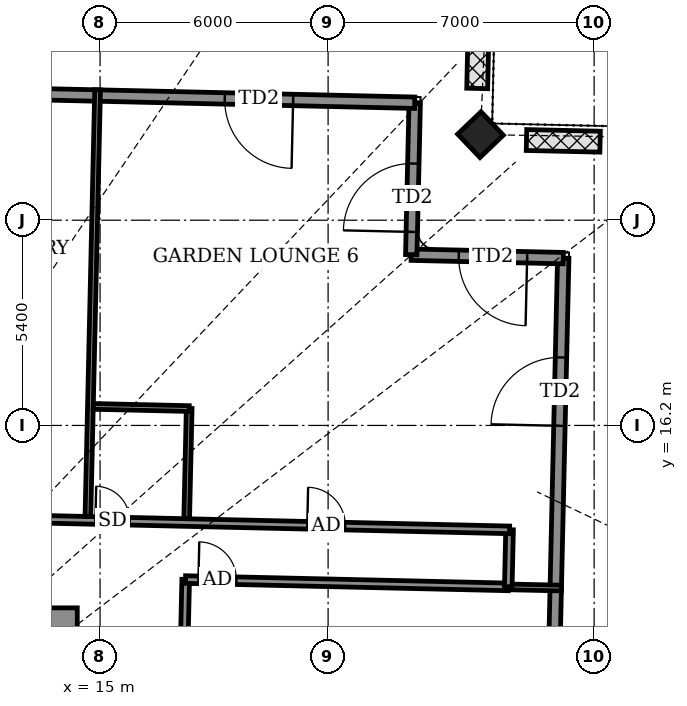
"""IFC4 building model, lengths in metres.
Left out: names, types, materials, properties, quantities, classifications, styles, units other than length and angle.
Written with IfcOpenShell. Run it as: python <this file> out.ifc"""

import sys

from ifc_helpers import new_model, si_unit, direction, frame, frame_2d, origin, origin_2d, place, context, subcontext, project, spatial, rectangle, extrude, element, fill, save


model = new_model("IFC4")
c1 = context("Model", 3, precision=1e-05, world=origin(), true_north=direction((0.0, 1.0)))
c2 = subcontext(c1, "Body", "Model", "MODEL_VIEW")
j1 = project(units=[si_unit("LENGTHUNIT", "METRE"), si_unit("PLANEANGLEUNIT", "RADIAN")], contexts=[c1])
p1 = place(None, origin())
s1 = spatial("IfcSite", under=j1, at=p1, CompositionType="ELEMENT")
p2 = place(p1, origin())
s2 = spatial("IfcBuilding", under=s1, at=p2, CompositionType="ELEMENT")
p3 = place(p2, frame((0.0, 0.0, 329.7)))
s3 = spatial("IfcBuildingStorey", under=s2, at=p3, CompositionType="ELEMENT", Elevation=329.7)
p4 = place(p3, frame((25.01, 23.851, -0.55), z_axis=(0.0, 0.0, 1.0), x_axis=(-0.690854032309, 0.722994264183, 0.0)))
e1 = element("IfcColumn", 1, at=p4, inside=s3, PredefinedType="COLUMN", context=c2, shape_type="SweptSolid", body=[
    extrude(rectangle(XDim=0.85, YDim=0.85, at=origin_2d()), origin(), (0.0, 0.0, 1.0), 4.6),
])
p5 = place(p3, frame((26.897, 7.826, 0.0), z_axis=(0.0, 0.0, 1.0), x_axis=(0.022695801562, 0.999742417121, 0.0)))
e2 = element("IfcWall", 2, at=p5, inside=s3, PredefinedType="SOLIDWALL", context=c2, shape_type="SweptSolid", body=[
    extrude(rectangle(XDim=12.779, YDim=0.3, at=frame_2d((6.39, 0.0))), origin(), (0.0, 0.0, 1.0), 2.25),
])
p6 = place(p5, frame((1.179, 0.0, 0.0)))
e3 = element("IfcOpeningElement", 3, at=p6, cuts=e2, PredefinedType="OPENING", context=c2, shape_type="SweptSolid", body=[
    extrude(rectangle(XDim=1.8, YDim=2.0, at=frame_2d((0.9, 1.0))), frame((0.0, 0.16, 0.0), z_axis=(0.0, -1.0, 0.0), x_axis=(1.0, 0.0, 0.0)), (0.0, 0.0, 1.0), 0.32),
])
p7 = place(p5, frame((8.366, 0.0, 0.0)))
e4 = element("IfcOpeningElement", 4, at=p7, cuts=e2, PredefinedType="OPENING", context=c2, shape_type="SweptSolid", body=[
    extrude(rectangle(XDim=1.8, YDim=2.0, at=frame_2d((0.9, 1.0))), frame((0.0, 0.16, 0.0), z_axis=(0.0, -1.0, 0.0), x_axis=(1.0, 0.0, 0.0)), (0.0, 0.0, 1.0), 0.32),
])
p8 = place(p3, frame((27.187, 20.602, 0.0), z_axis=(0.0, 0.0, 1.0), x_axis=(-0.999740826251, 0.022765770952, 0.0)))
e5 = element("IfcWall", 5, at=p8, inside=s3, PredefinedType="SOLIDWALL", context=c2, shape_type="SweptSolid", body=[
    extrude(rectangle(XDim=4.0, YDim=0.3, at=frame_2d((2.0, 0.0))), origin(), (0.0, 0.0, 1.0), 2.25),
])
p9 = place(p8, frame((0.95, 0.0, 0.0)))
e6 = element("IfcOpeningElement", 6, at=p9, cuts=e5, PredefinedType="OPENING", context=c2, shape_type="SweptSolid", body=[
    extrude(rectangle(XDim=1.8, YDim=2.0, at=frame_2d((0.9, 1.0))), frame((0.0, 0.16, 0.0), z_axis=(0.0, -1.0, 0.0), x_axis=(1.0, 0.0, 0.0)), (0.0, 0.0, 1.0), 0.32),
])
p10 = place(p3, frame((23.188, 20.693, 0.0), z_axis=(0.0, 0.0, 1.0), x_axis=(0.022772718728, 0.999740668014, 0.0)))
e7 = element("IfcWall", 7, at=p10, inside=s3, PredefinedType="SOLIDWALL", context=c2, shape_type="SweptSolid", body=[
    extrude(rectangle(XDim=3.999, YDim=0.3, at=frame_2d((2.0, 0.0))), origin(), (0.0, 0.0, 1.0), 2.1),
])
p11 = place(p10, frame((0.599, 0.0, 0.0)))
e8 = element("IfcOpeningElement", 8, at=p11, cuts=e7, PredefinedType="OPENING", context=c2, shape_type="SweptSolid", body=[
    extrude(rectangle(XDim=1.8, YDim=2.0, at=frame_2d((0.9, 1.0))), frame((0.0, 0.16, 0.0), z_axis=(0.0, -1.0, 0.0), x_axis=(1.0, 0.0, 0.0)), (0.0, 0.0, 1.0), 0.32),
])
p12 = place(p3, frame((23.279, 24.691, 0.0), z_axis=(0.0, 0.0, 1.0), x_axis=(-0.9997425899, 0.022688189451, 0.0)))
e9 = element("IfcWall", 9, at=p12, inside=s3, PredefinedType="SOLIDWALL", context=c2, shape_type="SweptSolid", body=[
    extrude(rectangle(XDim=47.25, YDim=0.3, at=frame_2d((23.625, 0.0))), origin(), (0.0, 0.0, 1.0), 2.1),
])
p13 = place(p12, frame((3.2, 0.0, 0.0)))
e10 = element("IfcOpeningElement", 10, at=p13, cuts=e9, PredefinedType="OPENING", context=c2, shape_type="SweptSolid", body=[
    extrude(rectangle(XDim=1.8, YDim=2.0, at=frame_2d((0.9, 1.0))), frame((0.0, 0.16, 0.0), z_axis=(0.0, -1.0, 0.0), x_axis=(1.0, 0.0, 0.0)), (0.0, 0.0, 1.0), 0.32),
])
p14 = place(p12, frame((10.45, 0.0, 0.0)))
e11 = element("IfcOpeningElement", 11, at=p14, cuts=e9, PredefinedType="OPENING", context=c2, shape_type="SweptSolid", body=[
    extrude(rectangle(XDim=1.8, YDim=2.0, at=frame_2d((0.9, 1.0))), frame((0.0, 0.16, 0.0), z_axis=(0.0, -1.0, 0.0), x_axis=(1.0, 0.0, 0.0)), (0.0, 0.0, 1.0), 0.32),
])
p15 = place(p12, frame((17.7, 0.0, 0.0)))
e12 = element("IfcOpeningElement", 12, at=p15, cuts=e9, PredefinedType="OPENING", context=c2, shape_type="SweptSolid", body=[
    extrude(rectangle(XDim=1.8, YDim=2.0, at=frame_2d((0.9, 1.0))), frame((0.0, 0.16, 0.0), z_axis=(0.0, -1.0, 0.0), x_axis=(1.0, 0.0, 0.0)), (0.0, 0.0, 1.0), 0.32),
])
p16 = place(p12, frame((28.3, 0.0, 0.0)))
e13 = element("IfcOpeningElement", 13, at=p16, cuts=e9, PredefinedType="OPENING", context=c2, shape_type="SweptSolid", body=[
    extrude(rectangle(XDim=1.8, YDim=2.0, at=frame_2d((0.9, 1.0))), frame((0.0, 0.16, 0.0), z_axis=(0.0, -1.0, 0.0), x_axis=(1.0, 0.0, 0.0)), (0.0, 0.0, 1.0), 0.32),
])
p17 = place(p12, frame((35.125, 0.0, 0.0)))
e14 = element("IfcOpeningElement", 14, at=p17, cuts=e9, PredefinedType="OPENING", context=c2, shape_type="SweptSolid", body=[
    extrude(rectangle(XDim=1.8, YDim=2.0, at=frame_2d((0.9, 1.0))), frame((0.0, 0.16, 0.0), z_axis=(0.0, -1.0, 0.0), x_axis=(1.0, 0.0, 0.0)), (0.0, 0.0, 1.0), 0.32),
])
p18 = place(p12, frame((42.7, 0.0, 0.0)))
e15 = element("IfcOpeningElement", 15, at=p18, cuts=e9, PredefinedType="OPENING", context=c2, shape_type="SweptSolid", body=[
    extrude(rectangle(XDim=1.8, YDim=2.0, at=frame_2d((0.9, 1.0))), frame((0.0, 0.16, 0.0), z_axis=(0.0, -1.0, 0.0), x_axis=(1.0, 0.0, 0.0)), (0.0, 0.0, 1.0), 0.32),
])
p19 = place(p3, frame((24.968, 27.054, 0.0), z_axis=(0.0, 0.0, 1.0), x_axis=(-0.022601425009, -0.999744555168, 0.0)))
e16 = element("IfcWall", 16, at=p19, inside=s3, PredefinedType="USERDEFINED", context=c2, shape_type="SweptSolid", body=[
    extrude(rectangle(XDim=1.988, YDim=0.55, at=frame_2d((0.994, 0.0))), origin(), (0.0, 0.0, 1.0), 0.8),
])
p20 = place(p3, frame((26.22, 23.71, 0.0), z_axis=(0.0, 0.0, 1.0), x_axis=(0.999742745482, -0.022681332769, 0.0)))
e17 = element("IfcWall", 17, at=p20, inside=s3, PredefinedType="USERDEFINED", context=c2, shape_type="SweptSolid", body=[
    extrude(rectangle(XDim=1.938, YDim=0.55, at=frame_2d((0.969, 0.0))), origin(), (0.0, 0.0, 1.0), 0.8),
])
p21 = place(p3, frame((17.155, 7.846, 0.0), z_axis=(0.0, 0.0, 1.0), x_axis=(0.022745886685, 0.999741278851, 0.0)))
e18 = element("IfcWall", 18, at=p21, inside=s3, PredefinedType="PARTITIONING", context=c2, shape_type="SweptSolid", body=[
    extrude(rectangle(XDim=4.304, YDim=0.2, at=frame_2d((2.152, 0.0))), origin(), (0.0, 0.0, 1.0), 4.05),
])
p22 = place(p3, frame((17.248, 12.145, 0.0), z_axis=(0.0, 0.0, 1.0), x_axis=(0.999741583257, -0.022732503302, 0.0)))
e19 = element("IfcWall", 19, at=p22, inside=s3, PredefinedType="PARTITIONING", context=c2, shape_type="SweptSolid", body=[
    extrude(rectangle(XDim=8.495, YDim=0.2, at=frame_2d((4.248, 0.0))), origin(), (0.0, 0.0, 1.0), 4.05),
])
p23 = place(p22, frame((0.34, 0.0, 0.0)))
e20 = element("IfcOpeningElement", 20, at=p23, cuts=e19, PredefinedType="OPENING", context=c2, shape_type="SweptSolid", body=[
    extrude(rectangle(XDim=1.0, YDim=2.1, at=frame_2d((0.5, 1.05))), frame((0.0, 0.11, 0.0), z_axis=(0.0, -1.0, 0.0), x_axis=(1.0, 0.0, 0.0)), (0.0, 0.0, 1.0), 0.22),
])
p24 = place(p3, frame((25.741, 11.952, 0.0), z_axis=(0.0, 0.0, 1.0), x_axis=(0.999754467928, -0.022158606881, 0.0)))
e21 = element("IfcWall", 21, at=p24, inside=s3, PredefinedType="PARTITIONING", context=c2, shape_type="SweptSolid", body=[
    extrude(rectangle(XDim=1.399, YDim=0.15, at=frame_2d((0.7, 0.0))), origin(), (0.0, 0.0, 1.0), 4.05),
])
p25 = place(p3, frame((25.741, 11.956, 0.0), z_axis=(0.0, 0.0, 1.0), x_axis=(0.022617910375, 0.999744182344, 0.0)))
e22 = element("IfcWall", 22, at=p25, inside=s3, PredefinedType="PARTITIONING", context=c2, shape_type="SweptSolid", body=[
    extrude(rectangle(XDim=1.5, YDim=0.2, at=frame_2d((0.75, 0.0))), origin(), (0.0, 0.0, 1.0), 4.05),
])
p26 = place(p3, frame((-26.962, 14.649, 0.0), z_axis=(0.0, 0.0, 1.0), x_axis=(0.999742499365, -0.022692178484, 0.0)))
e23 = element("IfcWall", 23, at=p26, inside=s3, PredefinedType="PARTITIONING", context=c2, shape_type="SweptSolid", body=[
    extrude(rectangle(XDim=52.75, YDim=0.2, at=frame_2d((26.375, 0.0))), origin(), (0.0, 0.0, 1.0), 2.1),
])
p27 = place(p26, frame((47.426, 0.0, 0.0)))
e24 = element("IfcOpeningElement", 24, at=p27, cuts=e23, PredefinedType="OPENING", context=c2, shape_type="SweptSolid", body=[
    extrude(rectangle(XDim=1.0, YDim=2.1, at=frame_2d((0.5, 1.05))), frame((0.0, 0.11, 0.0), z_axis=(0.0, -1.0, 0.0), x_axis=(1.0, 0.0, 0.0)), (0.0, 0.0, 1.0), 0.22),
])
p28 = place(p26, frame((41.85, 0.0, 0.0)))
e25 = element("IfcOpeningElement", 25, at=p28, cuts=e23, PredefinedType="OPENING", context=c2, shape_type="SweptSolid", body=[
    extrude(rectangle(XDim=0.9, YDim=2.1, at=frame_2d((0.45, 1.05))), frame((0.0, 0.11, 0.0), z_axis=(0.0, -1.0, 0.0), x_axis=(1.0, 0.0, 0.0)), (0.0, 0.0, 1.0), 0.22),
])
p29 = place(p26, frame((36.824, 0.0, 0.0)))
e26 = element("IfcOpeningElement", 26, at=p29, cuts=e23, PredefinedType="OPENING", context=c2, shape_type="SweptSolid", body=[
    extrude(rectangle(XDim=1.0, YDim=2.1, at=frame_2d((0.5, 1.05))), frame((0.0, 0.11, 0.0), z_axis=(0.0, -1.0, 0.0), x_axis=(1.0, 0.0, 0.0)), (0.0, 0.0, 1.0), 0.22),
])
p30 = place(p26, frame((28.436, 0.0, 0.0)))
e27 = element("IfcOpeningElement", 27, at=p30, cuts=e23, PredefinedType="OPENING", context=c2, shape_type="SweptSolid", body=[
    extrude(rectangle(XDim=1.0, YDim=2.1, at=frame_2d((0.5, 1.05))), frame((0.0, 0.11, 0.0), z_axis=(0.0, -1.0, 0.0), x_axis=(1.0, 0.0, 0.0)), (0.0, 0.0, 1.0), 0.22),
])
p31 = place(p26, frame((33.45, 0.0, 0.0)))
e28 = element("IfcOpeningElement", 28, at=p31, cuts=e23, PredefinedType="OPENING", context=c2, shape_type="SweptSolid", body=[
    extrude(rectangle(XDim=0.9, YDim=2.1, at=frame_2d((0.45, 1.05))), frame((0.0, 0.11, 0.0), z_axis=(0.0, -1.0, 0.0), x_axis=(1.0, 0.0, 0.0)), (0.0, 0.0, 1.0), 0.22),
])
p32 = place(p26, frame((24.05, 0.0, 0.0)))
e29 = element("IfcOpeningElement", 29, at=p32, cuts=e23, PredefinedType="OPENING", context=c2, shape_type="SweptSolid", body=[
    extrude(rectangle(XDim=1.0, YDim=2.1, at=frame_2d((0.5, 1.05))), frame((0.0, 0.11, 0.0), z_axis=(0.0, -1.0, 0.0), x_axis=(1.0, 0.0, 0.0)), (0.0, 0.0, 1.0), 0.22),
])
p33 = place(p26, frame((17.95, 0.0, 0.0)))
e30 = element("IfcOpeningElement", 30, at=p33, cuts=e23, PredefinedType="OPENING", context=c2, shape_type="SweptSolid", body=[
    extrude(rectangle(XDim=1.0, YDim=2.1, at=frame_2d((0.5, 1.05))), frame((0.0, 0.11, 0.0), z_axis=(0.0, -1.0, 0.0), x_axis=(1.0, 0.0, 0.0)), (0.0, 0.0, 1.0), 0.22),
])
p34 = place(p26, frame((21.65, 0.0, 0.0)))
e31 = element("IfcOpeningElement", 31, at=p34, cuts=e23, PredefinedType="OPENING", context=c2, shape_type="SweptSolid", body=[
    extrude(rectangle(XDim=0.9, YDim=2.1, at=frame_2d((0.45, 1.05))), frame((0.0, 0.11, 0.0), z_axis=(0.0, -1.0, 0.0), x_axis=(1.0, 0.0, 0.0)), (0.0, 0.0, 1.0), 0.22),
])
p35 = place(p26, frame((13.314, 0.0, 0.0)))
e32 = element("IfcOpeningElement", 32, at=p35, cuts=e23, PredefinedType="OPENING", context=c2, shape_type="SweptSolid", body=[
    extrude(rectangle(XDim=1.0, YDim=2.1, at=frame_2d((0.5, 1.05))), frame((0.0, 0.11, 0.0), z_axis=(0.0, -1.0, 0.0), x_axis=(1.0, 0.0, 0.0)), (0.0, 0.0, 1.0), 0.22),
])
p36 = place(p26, frame((10.4, 0.0, 0.0)))
e33 = element("IfcOpeningElement", 33, at=p36, cuts=e23, PredefinedType="OPENING", context=c2, shape_type="SweptSolid", body=[
    extrude(rectangle(XDim=0.9, YDim=2.1, at=frame_2d((0.45, 1.05))), frame((0.0, 0.11, 0.0), z_axis=(0.0, -1.0, 0.0), x_axis=(1.0, 0.0, 0.0)), (0.0, 0.0, 1.0), 0.22),
])
p37 = place(p26, frame((1.288, 0.0, 0.0)))
e34 = element("IfcOpeningElement", 34, at=p37, cuts=e23, PredefinedType="OPENING", context=c2, shape_type="SweptSolid", body=[
    extrude(rectangle(XDim=1.0, YDim=2.1, at=frame_2d((0.5, 1.05))), frame((0.0, 0.11, 0.0), z_axis=(0.0, -1.0, 0.0), x_axis=(1.0, 0.0, 0.0)), (0.0, 0.0, 1.0), 0.22),
])
p38 = place(p26, frame((8.0, 0.0, 0.0)))
e35 = element("IfcOpeningElement", 35, at=p38, cuts=e23, PredefinedType="OPENING", context=c2, shape_type="SweptSolid", body=[
    extrude(rectangle(XDim=0.9, YDim=2.1, at=frame_2d((0.45, 1.05))), frame((0.0, 0.11, 0.0), z_axis=(0.0, -1.0, 0.0), x_axis=(1.0, 0.0, 0.0)), (0.0, 0.0, 1.0), 0.22),
])
p39 = place(p3, frame((14.68, 13.808, 0.0), z_axis=(0.0, 0.0, 1.0), x_axis=(0.022726839589, 0.999741712025, 0.0)))
e36 = element("IfcWall", 36, at=p39, inside=s3, PredefinedType="PARTITIONING", context=c2, shape_type="SweptSolid", body=[
    extrude(rectangle(XDim=11.226, YDim=0.15, at=frame_2d((5.613, 0.0))), origin(), (0.0, 0.0, 1.0), 2.1),
])
p40 = place(p3, frame((17.279, 13.749, 0.0), z_axis=(0.0, 0.0, 1.0), x_axis=(0.022732880677, 0.999741574676, 0.0)))
e37 = element("IfcWall", 37, at=p40, inside=s3, PredefinedType="PARTITIONING", context=c2, shape_type="SweptSolid", body=[
    extrude(rectangle(XDim=2.9, YDim=0.15, at=frame_2d((1.45, 0.0))), origin(), (0.0, 0.0, 1.0), 2.25),
])
p41 = place(p3, frame((14.821, 16.701, 0.0), z_axis=(0.0, 0.0, 1.0), x_axis=(0.9997461113, -0.022532486354, 0.0)))
e38 = element("IfcWall", 38, at=p41, inside=s3, PredefinedType="PARTITIONING", context=c2, shape_type="SweptSolid", body=[
    extrude(rectangle(XDim=2.525, YDim=0.15, at=frame_2d((1.262, 0.0))), origin(), (0.0, 0.0, 1.0), 2.1),
])
p42 = place(p3, frame((-14.4, 11.1, 0.0), z_axis=(0.0, 0.0, 1.0), x_axis=(1.0, 0.0, 0.0)))
e39 = element("IfcWall", 39, at=p42, inside=s3, PredefinedType="SHEAR", context=c2, shape_type="SweptSolid", body=[
    extrude(rectangle(XDim=28.8, YDim=0.6, at=frame_2d((14.4, 0.0))), origin(), (0.0, 0.0, 1.0), 4.6),
])
p43 = place(p7, origin())
e40 = element("IfcDoor", 40, at=p43, inside=s3, OperationType="DOUBLE_DOOR_SINGLE_SWING", PredefinedType="DOOR", context=c2, shape_type="SweptSolid", body=[
    extrude(rectangle(XDim=1.8, YDim=2.0, at=frame_2d((0.9, 1.0))), frame((0.0, 0.025, 0.0), z_axis=(0.0, -1.0, 0.0), x_axis=(1.0, 0.0, 0.0)), (0.0, 0.0, 1.0), 0.05),
])
fill(e4, e40)
p44 = place(p9, origin())
e41 = element("IfcDoor", 41, at=p44, inside=s3, OperationType="DOUBLE_DOOR_SINGLE_SWING", PredefinedType="DOOR", context=c2, shape_type="SweptSolid", body=[
    extrude(rectangle(XDim=1.8, YDim=2.0, at=frame_2d((0.9, 1.0))), frame((0.0, 0.025, 0.0), z_axis=(0.0, -1.0, 0.0), x_axis=(1.0, 0.0, 0.0)), (0.0, 0.0, 1.0), 0.05),
])
fill(e6, e41)
p45 = place(p11, origin())
e42 = element("IfcDoor", 42, at=p45, inside=s3, OperationType="DOUBLE_DOOR_SINGLE_SWING", PredefinedType="DOOR", context=c2, shape_type="SweptSolid", body=[
    extrude(rectangle(XDim=1.8, YDim=2.0, at=frame_2d((0.9, 1.0))), frame((0.0, 0.025, 0.0), z_axis=(0.0, -1.0, 0.0), x_axis=(1.0, 0.0, 0.0)), (0.0, 0.0, 1.0), 0.05),
])
fill(e8, e42)
p46 = place(p13, origin())
e43 = element("IfcDoor", 43, at=p46, inside=s3, OperationType="DOUBLE_DOOR_SINGLE_SWING", PredefinedType="DOOR", context=c2, shape_type="SweptSolid", body=[
    extrude(rectangle(XDim=1.8, YDim=2.0, at=frame_2d((0.9, 1.0))), frame((0.0, 0.025, 0.0), z_axis=(0.0, -1.0, 0.0), x_axis=(1.0, 0.0, 0.0)), (0.0, 0.0, 1.0), 0.05),
])
fill(e10, e43)
p47 = place(p23, origin())
e44 = element("IfcDoor", 44, at=p47, inside=s3, OperationType="SINGLE_SWING_LEFT", PredefinedType="DOOR", context=c2, shape_type="SweptSolid", body=[
    extrude(rectangle(XDim=1.0, YDim=2.1, at=frame_2d((0.5, 1.05))), frame((0.0, 0.025, 0.0), z_axis=(0.0, -1.0, 0.0), x_axis=(1.0, 0.0, 0.0)), (0.0, 0.0, 1.0), 0.05),
])
fill(e20, e44)
p48 = place(p27, origin())
e45 = element("IfcDoor", 45, at=p48, inside=s3, OperationType="SINGLE_SWING_RIGHT", PredefinedType="DOOR", context=c2, shape_type="SweptSolid", body=[
    extrude(rectangle(XDim=1.0, YDim=2.1, at=frame_2d((0.5, 1.05))), frame((0.0, 0.025, 0.0), z_axis=(0.0, -1.0, 0.0), x_axis=(1.0, 0.0, 0.0)), (0.0, 0.0, 1.0), 0.05),
])
fill(e24, e45)
p49 = place(p28, origin())
e46 = element("IfcDoor", 46, at=p49, inside=s3, OperationType="SINGLE_SWING_RIGHT", PredefinedType="DOOR", context=c2, shape_type="SweptSolid", body=[
    extrude(rectangle(XDim=0.9, YDim=2.1, at=frame_2d((0.45, 1.05))), frame((0.0, 0.025, 0.0), z_axis=(0.0, -1.0, 0.0), x_axis=(1.0, 0.0, 0.0)), (0.0, 0.0, 1.0), 0.05),
])
fill(e25, e46)
save(model, sys.argv[1])
